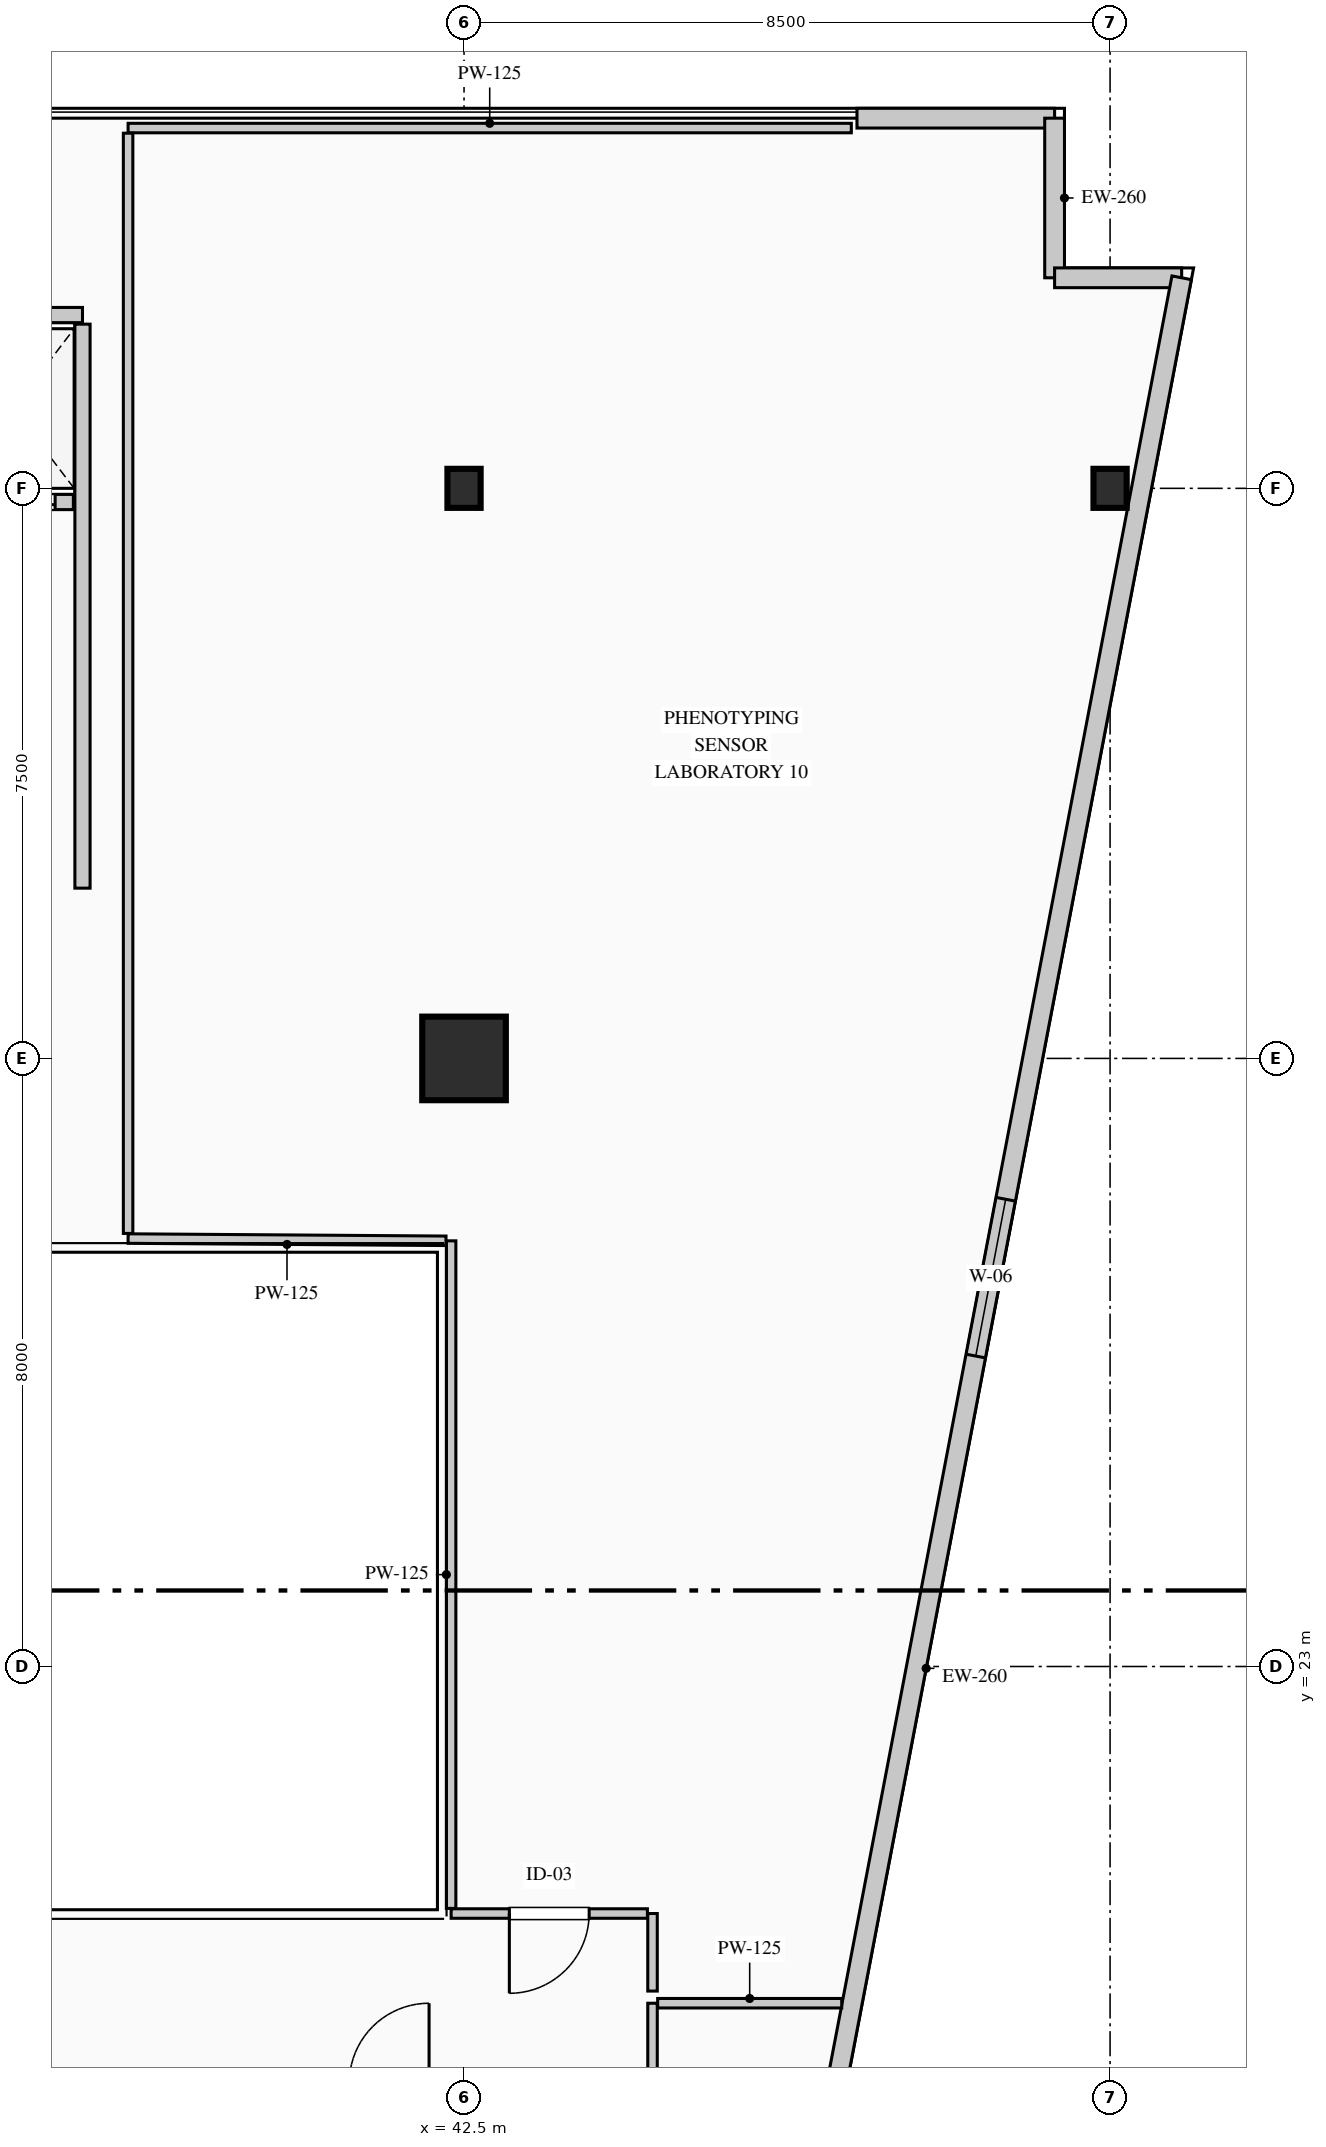
"""IFC4 building model, lengths in metres.
Left out: names, types, materials, properties, quantities, classifications, styles, units other than length and angle.
Written with IfcOpenShell. Run it as: python <this file> out.ifc"""

import sys

from ifc_helpers import new_model, si_unit, direction, frame, frame_2d, origin, origin_2d, place, context, subcontext, project, spatial, rectangle, i_section, extrude, element, fill, save


model = new_model("IFC4")
c1 = context("Model", 3, precision=1e-05, world=origin(), true_north=direction((0.0, 1.0)))
c2 = subcontext(c1, "Body", "Model", "MODEL_VIEW")
j1 = project(units=[si_unit("LENGTHUNIT", "METRE"), si_unit("PLANEANGLEUNIT", "RADIAN")], contexts=[c1])
p1 = place(None, origin())
s1 = spatial("IfcSite", under=j1, at=p1, CompositionType="ELEMENT")
p2 = place(p1, origin())
s2 = spatial("IfcBuilding", under=s1, at=p2, CompositionType="ELEMENT")
p3 = place(p2, frame((0.0, 0.0, 111.4)))
s3 = spatial("IfcBuildingStorey", under=s2, at=p3, CompositionType="ELEMENT", Elevation=111.4)
p4 = place(p3, frame((42.5, 31.0, 0.0), z_axis=(0.0, 0.0, 1.0), x_axis=(1.0, 0.0, 0.0)))
e1 = element("IfcColumn", 1, at=p4, inside=s3, PredefinedType="COLUMN", context=c2, shape_type="SweptSolid", body=[
    extrude(rectangle(XDim=1.1, YDim=1.1, at=origin_2d()), origin(), (0.0, 0.0, 1.0), 3.95),
])
for number, where, z_axis, x_axis in (
    (2, (42.5, 38.5, 0.0), (0.0, 0.0, 1.0), (1.0, 0.0, 0.0)),
    (3, (51.0, 38.5, 0.0), (0.0, 0.0, 1.0), (1.0, 0.0, 0.0)),
):
    element("IfcColumn", number, at=place(p3, frame(where, z_axis=z_axis, x_axis=x_axis)), inside=s3, PredefinedType="COLUMN", context=c2, shape_type="SweptSolid", body=[
        extrude(i_section(OverallWidth=0.437, OverallDepth=0.514, WebThickness=0.061, FlangeThickness=0.077, FilletRadius=0.015, at=origin_2d()), origin(), (0.0, 0.0, 1.0), 3.95),
    ])
p5 = place(p3, frame((47.67, 43.37, 0.0), z_axis=(0.0, 0.0, 1.0), x_axis=(1.0, 0.0, 0.0)))
e4 = element("IfcWall", 4, at=p5, inside=s3, PredefinedType="STANDARD", context=c2, shape_type="SweptSolid", body=[
    extrude(rectangle(XDim=2.6, YDim=0.26, at=frame_2d((1.3, 0.0))), origin(), (0.0, 0.0, 1.0), 3.69),
])
p6 = place(p3, frame((50.27, 43.37, 0.0), z_axis=(0.0, 0.0, 1.0), x_axis=(0.0, -1.0, 0.0)))
e5 = element("IfcWall", 5, at=p6, inside=s3, PredefinedType="STANDARD", context=c2, shape_type="SweptSolid", body=[
    extrude(rectangle(XDim=2.1, YDim=0.26, at=frame_2d((1.05, 0.0))), origin(), (0.0, 0.0, 1.0), 3.69),
])
p7 = place(p3, frame((50.27, 41.27, 0.0), z_axis=(0.0, 0.0, 1.0), x_axis=(1.0, 0.0, 0.0)))
e6 = element("IfcWall", 6, at=p7, inside=s3, PredefinedType="STANDARD", context=c2, shape_type="SweptSolid", body=[
    extrude(rectangle(XDim=1.672, YDim=0.26, at=frame_2d((0.836, 0.0))), origin(), (0.0, 0.0, 1.0), 3.69),
])
p8 = place(p3, frame((51.942, 41.27, 0.0), z_axis=(0.0, 0.0, 1.0), x_axis=(-0.187592192405, -0.982247000173, 0.0)))
e7 = element("IfcWall", 7, at=p8, inside=s3, PredefinedType="STANDARD", context=c2, shape_type="SweptSolid", body=[
    extrude(rectangle(XDim=37.2, YDim=0.26, at=frame_2d((18.6, 0.0))), origin(), (0.0, 0.0, 1.0), 3.69),
])
p9 = place(p8, frame((12.342, 0.0, 0.9)))
e8 = element("IfcOpeningElement", 8, at=p9, cuts=e7, PredefinedType="OPENING", context=c2, shape_type="SweptSolid", body=[
    extrude(rectangle(XDim=2.1, YDim=2.0, at=frame_2d((1.05, 1.0))), frame((0.0, 0.14, 0.0), z_axis=(0.0, -1.0, 0.0), x_axis=(1.0, 0.0, 0.0)), (0.0, 0.0, 1.0), 0.28),
])
p10 = place(p3, frame((30.5, 40.78, 0.0), z_axis=(0.0, 0.0, 1.0), x_axis=(1.0, 0.0, 0.0)))
e9 = element("IfcWall", 9, at=p10, inside=s3, PredefinedType="PARTITIONING", context=c2, shape_type="SweptSolid", body=[
    extrude(rectangle(XDim=6.98, YDim=0.2, at=frame_2d((3.49, 0.0))), origin(), (0.0, 0.0, 1.0), 3.69),
])
p11 = place(p3, frame((37.48, 33.24, 0.0), z_axis=(0.0, 0.0, 1.0), x_axis=(0.0, 1.0, 0.0)))
e10 = element("IfcWall", 10, at=p11, inside=s3, PredefinedType="PARTITIONING", context=c2, shape_type="SweptSolid", body=[
    extrude(rectangle(XDim=7.42, YDim=0.2, at=frame_2d((3.71, 0.0))), origin(), (0.0, 0.0, 1.0), 3.69),
])
p12 = place(p3, frame((30.5, 38.32, 0.0), z_axis=(0.0, 0.0, 1.0), x_axis=(1.0, 0.0, 0.0)))
e11 = element("IfcWall", 11, at=p12, inside=s3, PredefinedType="PARTITIONING", context=c2, shape_type="SweptSolid", body=[
    extrude(rectangle(XDim=6.86, YDim=0.2, at=frame_2d((3.43, 0.0))), origin(), (0.0, 0.0, 1.0), 3.69),
])
p13 = place(p12, frame((0.36, 0.0, 0.0)))
e12 = element("IfcOpeningElement", 12, at=p13, cuts=e11, PredefinedType="OPENING", context=c2, shape_type="SweptSolid", body=[
    extrude(rectangle(XDim=1.1, YDim=2.2, at=frame_2d((0.55, 1.1))), frame((0.0, 0.11, 0.0), z_axis=(0.0, -1.0, 0.0), x_axis=(1.0, 0.0, 0.0)), (0.0, 0.0, 1.0), 0.22),
])
p14 = place(p12, frame((2.08, 0.0, 0.0)))
e13 = element("IfcOpeningElement", 13, at=p14, cuts=e11, PredefinedType="OPENING", context=c2, shape_type="SweptSolid", body=[
    extrude(rectangle(XDim=1.1, YDim=2.2, at=frame_2d((0.55, 1.1))), frame((0.0, 0.11, 0.0), z_axis=(0.0, -1.0, 0.0), x_axis=(1.0, 0.0, 0.0)), (0.0, 0.0, 1.0), 0.22),
])
p15 = place(p12, frame((3.8, 0.0, 0.0)))
e14 = element("IfcOpeningElement", 14, at=p15, cuts=e11, PredefinedType="OPENING", context=c2, shape_type="SweptSolid", body=[
    extrude(rectangle(XDim=1.1, YDim=2.2, at=frame_2d((0.55, 1.1))), frame((0.0, 0.11, 0.0), z_axis=(0.0, -1.0, 0.0), x_axis=(1.0, 0.0, 0.0)), (0.0, 0.0, 1.0), 0.22),
])
p16 = place(p12, frame((5.52, 0.0, 0.0)))
e15 = element("IfcOpeningElement", 15, at=p16, cuts=e11, PredefinedType="OPENING", context=c2, shape_type="SweptSolid", body=[
    extrude(rectangle(XDim=1.1, YDim=2.2, at=frame_2d((0.55, 1.1))), frame((0.0, 0.11, 0.0), z_axis=(0.0, -1.0, 0.0), x_axis=(1.0, 0.0, 0.0)), (0.0, 0.0, 1.0), 0.22),
])
p17 = place(p3, frame((44.98, 17.55, 0.0), z_axis=(0.0, 0.0, 1.0), x_axis=(0.0, 1.0, 0.0)))
e16 = element("IfcWall", 16, at=p17, inside=s3, PredefinedType="PARTITIONING", context=c2, shape_type="SweptSolid", body=[
    extrude(rectangle(XDim=1.02, YDim=0.125, at=frame_2d((0.51, 0.0))), origin(), (0.0, 0.0, 1.0), 3.69),
])
p18 = place(p3, frame((45.048, 18.57, 0.0), z_axis=(0.0, 0.0, 1.0), x_axis=(1.0, 0.0, 0.0)))
e17 = element("IfcWall", 17, at=p18, inside=s3, PredefinedType="PARTITIONING", context=c2, shape_type="SweptSolid", body=[
    extrude(rectangle(XDim=2.422, YDim=0.125, at=frame_2d((1.211, 0.0))), origin(), (0.0, 0.0, 1.0), 3.69),
])
p19 = place(p3, frame((38.08, 43.24, 0.0), z_axis=(0.0, 0.0, 1.0), x_axis=(1.0, 0.0, 0.0)))
e18 = element("IfcWall", 18, at=p19, inside=s3, PredefinedType="PARTITIONING", context=c2, shape_type="SweptSolid", body=[
    extrude(rectangle(XDim=9.515, YDim=0.125, at=frame_2d((4.758, 0.0))), origin(), (0.0, 0.0, 1.0), 3.69),
])
p20 = place(p3, frame((44.98, 18.73, 0.0), z_axis=(0.0, 0.0, 1.0), x_axis=(0.0, 1.0, 0.0)))
e19 = element("IfcWall", 19, at=p20, inside=s3, PredefinedType="PARTITIONING", context=c2, shape_type="SweptSolid", body=[
    extrude(rectangle(XDim=1.02, YDim=0.125, at=frame_2d((0.51, 0.0))), origin(), (0.0, 0.0, 1.0), 3.69),
])
p21 = place(p3, frame((44.913, 19.75, 0.0), z_axis=(0.0, 0.0, 1.0), x_axis=(-1.0, 0.0, 0.0)))
e20 = element("IfcWall", 20, at=p21, inside=s3, PredefinedType="PARTITIONING", context=c2, shape_type="SweptSolid", body=[
    extrude(rectangle(XDim=2.583, YDim=0.125, at=frame_2d((1.291, 0.0))), origin(), (0.0, 0.0, 1.0), 3.69),
])
p22 = place(p21, frame((0.766, 0.0, 0.0)))
e21 = element("IfcOpeningElement", 21, at=p22, cuts=e20, PredefinedType="OPENING", context=c2, shape_type="SweptSolid", body=[
    extrude(rectangle(XDim=1.05, YDim=2.15, at=frame_2d((0.525, 1.075))), frame((0.0, 0.073, 0.0), z_axis=(0.0, -1.0, 0.0), x_axis=(1.0, 0.0, 0.0)), (0.0, 0.0, 1.0), 0.145),
])
p23 = place(p3, frame((42.33, 19.817, 0.0), z_axis=(0.0, 0.0, 1.0), x_axis=(0.0, 1.0, 0.0)))
e22 = element("IfcWall", 22, at=p23, inside=s3, PredefinedType="PARTITIONING", context=c2, shape_type="SweptSolid", body=[
    extrude(rectangle(XDim=8.783, YDim=0.125, at=frame_2d((4.391, 0.0))), origin(), (0.0, 0.0, 1.0), 3.69),
])
p24 = place(p3, frame((42.262, 28.601, 0.0), z_axis=(0.0, 0.0, 1.0), x_axis=(-0.999975466976, 0.007004673168, 0.0)))
e23 = element("IfcWall", 23, at=p24, inside=s3, PredefinedType="PARTITIONING", context=c2, shape_type="SweptSolid", body=[
    extrude(rectangle(XDim=4.182, YDim=0.125, at=frame_2d((2.091, 0.0))), origin(), (0.0, 0.0, 1.0), 3.69),
])
p25 = place(p3, frame((38.08, 28.698, 0.0), z_axis=(0.0, 0.0, 1.0), x_axis=(0.0, 1.0, 0.0)))
e24 = element("IfcWall", 24, at=p25, inside=s3, PredefinedType="PARTITIONING", context=c2, shape_type="SweptSolid", body=[
    extrude(rectangle(XDim=14.475, YDim=0.125, at=frame_2d((7.238, 0.0))), origin(), (0.0, 0.0, 1.0), 3.69),
])
p26 = place(p9, origin())
e25 = element("IfcWindow", 25, at=p26, inside=s3, PartitioningType="DOUBLE_PANEL_VERTICAL", PredefinedType="WINDOW", context=c2, shape_type="SweptSolid", body=[
    extrude(rectangle(XDim=2.1, YDim=2.0, at=frame_2d((1.05, 1.0))), frame((0.0, 0.03, 0.0), z_axis=(0.0, -1.0, 0.0), x_axis=(1.0, 0.0, 0.0)), (0.0, 0.0, 1.0), 0.06),
])
fill(e8, e25)
p27 = place(p16, origin())
e26 = element("IfcDoor", 26, at=p27, inside=s3, OperationType="DOUBLE_DOOR_SLIDING", PredefinedType="DOOR", context=c2, shape_type="SweptSolid", body=[
    extrude(rectangle(XDim=1.1, YDim=2.2, at=frame_2d((0.55, 1.1))), frame((0.0, 0.025, 0.0), z_axis=(0.0, -1.0, 0.0), x_axis=(1.0, 0.0, 0.0)), (0.0, 0.0, 1.0), 0.05),
])
fill(e15, e26)
p28 = place(p22, origin())
e27 = element("IfcDoor", 27, at=p28, inside=s3, OperationType="SINGLE_SWING_RIGHT", PredefinedType="DOOR", context=c2, shape_type="SweptSolid", body=[
    extrude(rectangle(XDim=1.05, YDim=2.15, at=frame_2d((0.525, 1.075))), frame((0.0, 0.025, 0.0), z_axis=(0.0, -1.0, 0.0), x_axis=(1.0, 0.0, 0.0)), (0.0, 0.0, 1.0), 0.05),
])
fill(e21, e27)
save(model, sys.argv[1])
